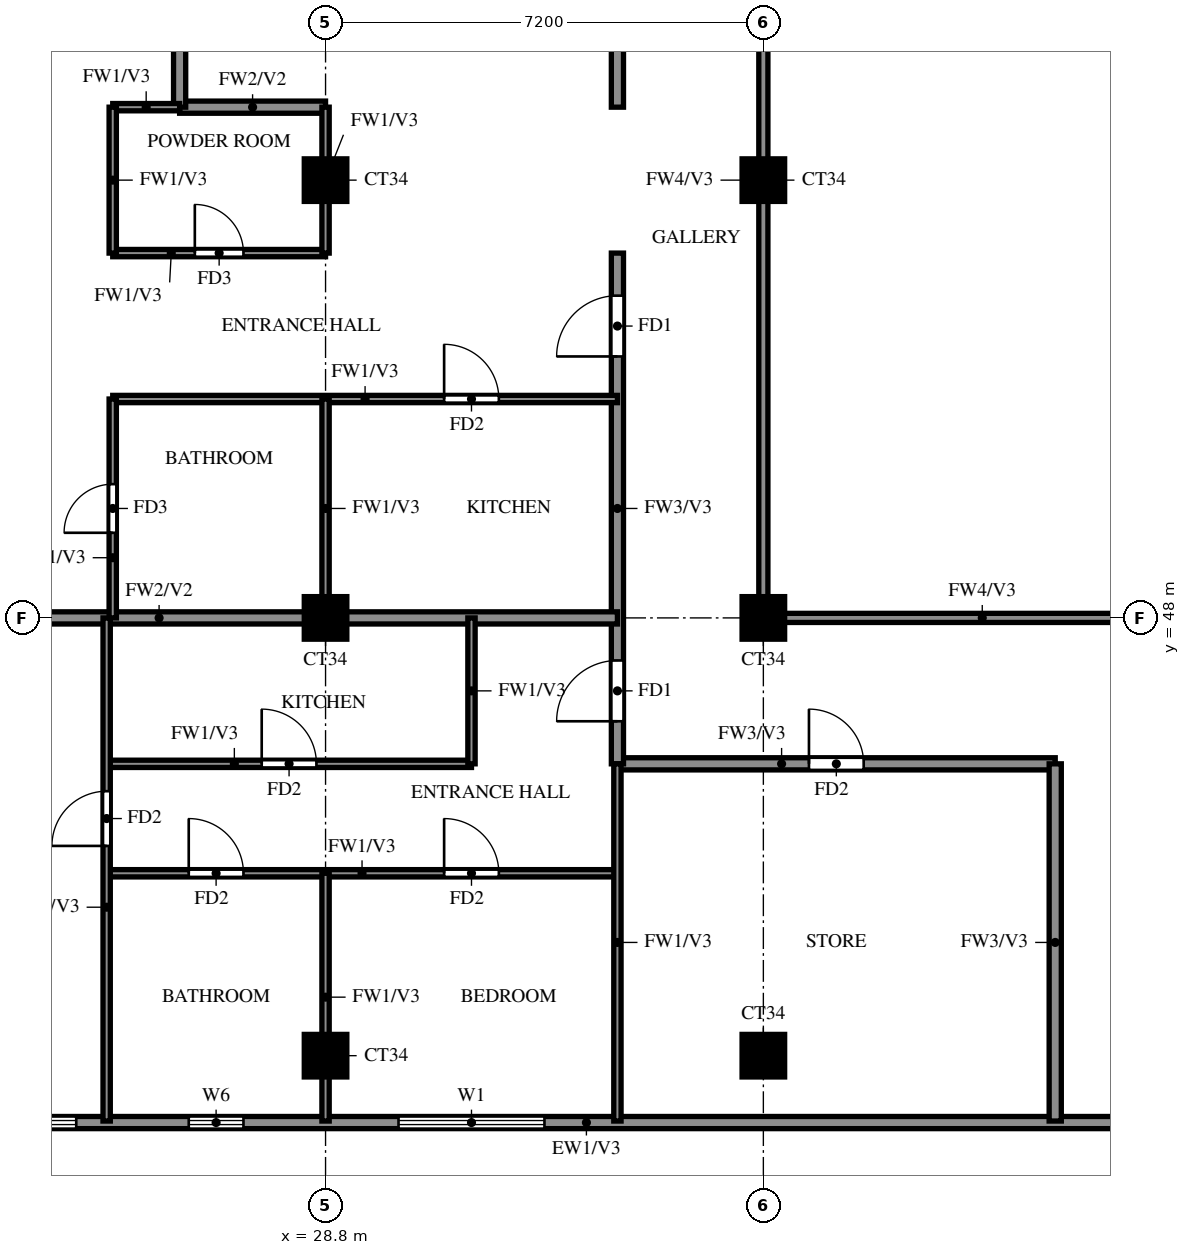
"""IFC4 building model, lengths in metres.
Left out: names, types, materials, properties, quantities, classifications, styles, units other than length and angle.
Written with IfcOpenShell. Run it as: python <this file> out.ifc"""

import sys

from ifc_helpers import new_model, si_unit, direction, frame, frame_2d, origin, origin_2d, place, context, subcontext, project, spatial, rectangle, extrude, source, transform, mapped, element, fill, save


model = new_model("IFC4")
c1 = context("Model", 3, precision=1e-05, world=origin(), true_north=direction((0.0, 1.0)))
c2 = subcontext(c1, "Body", "Model", "MODEL_VIEW")
j1 = project(units=[si_unit("LENGTHUNIT", "METRE"), si_unit("PLANEANGLEUNIT", "RADIAN")], contexts=[c1])
p1 = place(None, origin())
s1 = spatial("IfcSite", under=j1, at=p1, CompositionType="ELEMENT")
p2 = place(p1, origin())
s2 = spatial("IfcBuilding", under=s1, at=p2, CompositionType="ELEMENT")
p3 = place(p2, frame((0.0, 0.0, 257.0)))
s3 = spatial("IfcBuildingStorey", under=s2, at=p3, CompositionType="ELEMENT", Elevation=257.0)
m1 = source(origin(), c2, "Body", "SweptSolid", [
    extrude(rectangle(XDim=0.7, YDim=0.7, at=origin_2d()), origin(), (0.0, 0.0, 1.0), 3.22),
])
for number, where, z_axis, x_axis in (
    (1, (28.8, 40.8, 0.0), (0.0, 0.0, 1.0), (1.0, 0.0, 0.0)),
    (2, (36.0, 40.8, 0.0), (0.0, 0.0, 1.0), (1.0, 0.0, 0.0)),
    (3, (28.8, 48.0, 0.0), (0.0, 0.0, 1.0), (1.0, 0.0, 0.0)),
    (4, (36.0, 48.0, 0.0), (0.0, 0.0, 1.0), (1.0, 0.0, 0.0)),
    (5, (28.8, 55.2, 0.0), (0.0, 0.0, 1.0), (1.0, 0.0, 0.0)),
    (6, (36.0, 55.2, 0.0), (0.0, 0.0, 1.0), (1.0, 0.0, 0.0)),
):
    element("IfcColumn", number, at=place(p3, frame(where, z_axis=z_axis, x_axis=x_axis)), inside=s3, PredefinedType="COLUMN", context=c2, shape_type="MappedRepresentation", body=[
        mapped(m1, transform((0.0, 0.0, 0.0))),
    ])
p4 = place(p3, frame((22.2, 39.7, 0.0), z_axis=(0.0, 0.0, 1.0), x_axis=(1.0, 0.0, 0.0)))
e7 = element("IfcWall", 7, at=p4, inside=s3, PredefinedType="SOLIDWALL", context=c2, shape_type="SweptSolid", body=[
    extrude(rectangle(XDim=19.8, YDim=0.2, at=frame_2d((9.9, 0.0))), origin(), (0.0, 0.0, 1.0), 3.22),
])
p5 = place(p4, frame((0.7, 0.0, 0.6)))
e8 = element("IfcOpeningElement", 8, at=p5, cuts=e7, PredefinedType="OPENING", context=c2, shape_type="SweptSolid", body=[
    extrude(rectangle(XDim=1.8, YDim=2.4, at=frame_2d((0.9, 1.2))), frame((0.0, 0.11, 0.0), z_axis=(0.0, -1.0, 0.0), x_axis=(1.0, 0.0, 0.0)), (0.0, 0.0, 1.0), 0.22),
])
p6 = place(p4, frame((4.35, 0.0, 1.5)))
e9 = element("IfcOpeningElement", 9, at=p6, cuts=e7, PredefinedType="OPENING", context=c2, shape_type="SweptSolid", body=[
    extrude(rectangle(XDim=0.9, YDim=0.9, at=frame_2d((0.45, 0.45))), frame((0.0, 0.11, 0.0), z_axis=(0.0, -1.0, 0.0), x_axis=(1.0, 0.0, 0.0)), (0.0, 0.0, 1.0), 0.22),
])
p7 = place(p4, frame((7.8, 0.0, 0.6)))
e10 = element("IfcOpeningElement", 10, at=p7, cuts=e7, PredefinedType="OPENING", context=c2, shape_type="SweptSolid", body=[
    extrude(rectangle(XDim=2.4, YDim=2.4, at=frame_2d((1.2, 1.2))), frame((0.0, 0.11, 0.0), z_axis=(0.0, -1.0, 0.0), x_axis=(1.0, 0.0, 0.0)), (0.0, 0.0, 1.0), 0.22),
])
p8 = place(p3, frame((33.6, 45.6, 0.0), z_axis=(0.0, 0.0, 1.0), x_axis=(1.0, 0.0, 0.0)))
e11 = element("IfcWall", 11, at=p8, inside=s3, PredefinedType="SOLIDWALL", context=c2, shape_type="SweptSolid", body=[
    extrude(rectangle(XDim=7.2, YDim=0.2, at=frame_2d((3.6, 0.0))), origin(), (0.0, 0.0, 1.0), 3.22),
])
p9 = place(p8, frame((3.15, 0.0, 0.0)))
e12 = element("IfcOpeningElement", 12, at=p9, cuts=e11, PredefinedType="OPENING", context=c2, shape_type="SweptSolid", body=[
    extrude(rectangle(XDim=0.9, YDim=2.1, at=frame_2d((0.45, 1.05))), frame((0.0, 0.11, 0.0), z_axis=(0.0, -1.0, 0.0), x_axis=(1.0, 0.0, 0.0)), (0.0, 0.0, 1.0), 0.22),
])
p10 = place(p3, frame((33.6, 45.6, 0.0), z_axis=(0.0, 0.0, 1.0), x_axis=(0.0, 1.0, 0.0)))
e13 = element("IfcWall", 13, at=p10, inside=s3, PredefinedType="SOLIDWALL", context=c2, shape_type="SweptSolid", body=[
    extrude(rectangle(XDim=8.4, YDim=0.2, at=frame_2d((4.2, 0.0))), origin(), (0.0, 0.0, 1.0), 3.22),
])
p11 = place(p10, frame((0.7, 0.0, 0.0)))
e14 = element("IfcOpeningElement", 14, at=p11, cuts=e13, PredefinedType="OPENING", context=c2, shape_type="SweptSolid", body=[
    extrude(rectangle(XDim=1.0, YDim=2.1, at=frame_2d((0.5, 1.05))), frame((0.0, 0.11, 0.0), z_axis=(0.0, -1.0, 0.0), x_axis=(1.0, 0.0, 0.0)), (0.0, 0.0, 1.0), 0.22),
])
p12 = place(p10, frame((6.7, 0.0, 0.0)))
e15 = element("IfcOpeningElement", 15, at=p12, cuts=e13, PredefinedType="OPENING", context=c2, shape_type="SweptSolid", body=[
    extrude(rectangle(XDim=1.0, YDim=2.1, at=frame_2d((0.5, 1.05))), frame((0.0, 0.11, 0.0), z_axis=(0.0, -1.0, 0.0), x_axis=(1.0, 0.0, 0.0)), (0.0, 0.0, 1.0), 0.22),
])
p13 = place(p3, frame((33.6, 56.4, 0.0), z_axis=(0.0, 0.0, 1.0), x_axis=(0.0, 1.0, 0.0)))
e16 = element("IfcWall", 16, at=p13, inside=s3, PredefinedType="SOLIDWALL", context=c2, shape_type="SweptSolid", body=[
    extrude(rectangle(XDim=6.0, YDim=0.2, at=frame_2d((3.0, 0.0))), origin(), (0.0, 0.0, 1.0), 3.22),
])
p14 = place(p13, frame((3.7, 0.0, 0.0)))
e17 = element("IfcOpeningElement", 17, at=p14, cuts=e16, PredefinedType="OPENING", context=c2, shape_type="SweptSolid", body=[
    extrude(rectangle(XDim=1.0, YDim=2.1, at=frame_2d((0.5, 1.05))), frame((0.0, 0.11, 0.0), z_axis=(0.0, -1.0, 0.0), x_axis=(1.0, 0.0, 0.0)), (0.0, 0.0, 1.0), 0.22),
])
p15 = place(p3, frame((40.8, 39.725, 0.0), z_axis=(0.0, 0.0, 1.0), x_axis=(0.0, 1.0, 0.0)))
e18 = element("IfcWall", 18, at=p15, inside=s3, PredefinedType="SOLIDWALL", context=c2, shape_type="SweptSolid", body=[
    extrude(rectangle(XDim=5.875, YDim=0.2, at=frame_2d((2.938, 0.0))), origin(), (0.0, 0.0, 1.0), 3.22),
])
p16 = place(p3, frame((18.525, 48.0, 0.0), z_axis=(0.0, 0.0, 1.0), x_axis=(1.0, 0.0, 0.0)))
e19 = element("IfcWall", 19, at=p16, inside=s3, PredefinedType="SOLIDWALL", context=c2, shape_type="SweptSolid", body=[
    extrude(rectangle(XDim=15.075, YDim=0.2, at=frame_2d((7.538, 0.0))), origin(), (0.0, 0.0, 1.0), 3.22),
])
for number, where, z_axis, x_axis in (
    (20, (26.4, 56.4, 0.0), (0.0, 0.0, 1.0), (1.0, 0.0, 0.0)),
    (21, (26.4, 56.4, 0.0), (0.0, 0.0, 1.0), (0.0, 1.0, 0.0)),
):
    element("IfcWall", number, at=place(p3, frame(where, z_axis=z_axis, x_axis=x_axis)), inside=s3, PredefinedType="SOLIDWALL", context=c2, shape_type="SweptSolid", body=[
        extrude(rectangle(XDim=2.4, YDim=0.2, at=frame_2d((1.2, 0.0))), origin(), (0.0, 0.0, 1.0), 3.22),
    ])
p17 = place(p3, frame((25.2, 43.8, 0.0), z_axis=(0.0, 0.0, 1.0), x_axis=(1.0, 0.0, 0.0)))
e22 = element("IfcWall", 22, at=p17, inside=s3, PredefinedType="PARTITIONING", context=c2, shape_type="SweptSolid", body=[
    extrude(rectangle(XDim=8.4, YDim=0.12, at=frame_2d((4.2, 0.0))), origin(), (0.0, 0.0, 1.0), 3.22),
])
p18 = place(p17, frame((1.35, 0.0, 0.0)))
e23 = element("IfcOpeningElement", 23, at=p18, cuts=e22, PredefinedType="OPENING", context=c2, shape_type="SweptSolid", body=[
    extrude(rectangle(XDim=0.9, YDim=2.1, at=frame_2d((0.45, 1.05))), frame((0.0, 0.07, 0.0), z_axis=(0.0, -1.0, 0.0), x_axis=(1.0, 0.0, 0.0)), (0.0, 0.0, 1.0), 0.14),
])
p19 = place(p17, frame((5.55, 0.0, 0.0)))
e24 = element("IfcOpeningElement", 24, at=p19, cuts=e22, PredefinedType="OPENING", context=c2, shape_type="SweptSolid", body=[
    extrude(rectangle(XDim=0.9, YDim=2.1, at=frame_2d((0.45, 1.05))), frame((0.0, 0.07, 0.0), z_axis=(0.0, -1.0, 0.0), x_axis=(1.0, 0.0, 0.0)), (0.0, 0.0, 1.0), 0.14),
])
p20 = place(p3, frame((25.2, 45.6, 0.0), z_axis=(0.0, 0.0, 1.0), x_axis=(1.0, 0.0, 0.0)))
e25 = element("IfcWall", 25, at=p20, inside=s3, PredefinedType="PARTITIONING", context=c2, shape_type="SweptSolid", body=[
    extrude(rectangle(XDim=6.0, YDim=0.12, at=frame_2d((3.0, 0.0))), origin(), (0.0, 0.0, 1.0), 3.22),
])
p21 = place(p20, frame((2.55, 0.0, 0.0)))
e26 = element("IfcOpeningElement", 26, at=p21, cuts=e25, PredefinedType="OPENING", context=c2, shape_type="SweptSolid", body=[
    extrude(rectangle(XDim=0.9, YDim=2.1, at=frame_2d((0.45, 1.05))), frame((0.0, 0.07, 0.0), z_axis=(0.0, -1.0, 0.0), x_axis=(1.0, 0.0, 0.0)), (0.0, 0.0, 1.0), 0.14),
])
p22 = place(p3, frame((25.3, 51.6, 0.0), z_axis=(0.0, 0.0, 1.0), x_axis=(1.0, 0.0, 0.0)))
e27 = element("IfcWall", 27, at=p22, inside=s3, PredefinedType="PARTITIONING", context=c2, shape_type="SweptSolid", body=[
    extrude(rectangle(XDim=8.3, YDim=0.12, at=frame_2d((4.15, 0.0))), origin(), (0.0, 0.0, 1.0), 3.22),
])
p23 = place(p22, frame((5.45, 0.0, 0.0)))
e28 = element("IfcOpeningElement", 28, at=p23, cuts=e27, PredefinedType="OPENING", context=c2, shape_type="SweptSolid", body=[
    extrude(rectangle(XDim=0.9, YDim=2.1, at=frame_2d((0.45, 1.05))), frame((0.0, 0.07, 0.0), z_axis=(0.0, -1.0, 0.0), x_axis=(1.0, 0.0, 0.0)), (0.0, 0.0, 1.0), 0.14),
])
p24 = place(p3, frame((25.3, 54.0, 0.0), z_axis=(0.0, 0.0, 1.0), x_axis=(1.0, 0.0, 0.0)))
e29 = element("IfcWall", 29, at=p24, inside=s3, PredefinedType="PARTITIONING", context=c2, shape_type="SweptSolid", body=[
    extrude(rectangle(XDim=3.5, YDim=0.12, at=frame_2d((1.75, 0.0))), origin(), (0.0, 0.0, 1.0), 3.22),
])
p25 = place(p24, frame((1.35, 0.0, 0.0)))
e30 = element("IfcOpeningElement", 30, at=p25, cuts=e29, PredefinedType="OPENING", context=c2, shape_type="SweptSolid", body=[
    extrude(rectangle(XDim=0.8, YDim=2.1, at=frame_2d((0.4, 1.05))), frame((0.0, 0.07, 0.0), z_axis=(0.0, -1.0, 0.0), x_axis=(1.0, 0.0, 0.0)), (0.0, 0.0, 1.0), 0.14),
])
p26 = place(p3, frame((25.3, 56.4, 0.0), z_axis=(0.0, 0.0, 1.0), x_axis=(1.0, 0.0, 0.0)))
e31 = element("IfcWall", 31, at=p26, inside=s3, PredefinedType="PARTITIONING", context=c2, shape_type="SweptSolid", body=[
    extrude(rectangle(XDim=1.1, YDim=0.12, at=frame_2d((0.55, 0.0))), origin(), (0.0, 0.0, 1.0), 3.22),
])
p27 = place(p3, frame((25.2, 39.725, 0.0), z_axis=(0.0, 0.0, 1.0), x_axis=(0.0, 1.0, 0.0)))
e32 = element("IfcWall", 32, at=p27, inside=s3, PredefinedType="PARTITIONING", context=c2, shape_type="SweptSolid", body=[
    extrude(rectangle(XDim=8.275, YDim=0.12, at=frame_2d((4.137, 0.0))), origin(), (0.0, 0.0, 1.0), 3.22),
])
p28 = place(p27, frame((4.525, 0.0, 0.0)))
e33 = element("IfcOpeningElement", 33, at=p28, cuts=e32, PredefinedType="OPENING", context=c2, shape_type="SweptSolid", body=[
    extrude(rectangle(XDim=0.9, YDim=2.1, at=frame_2d((0.45, 1.05))), frame((0.0, 0.07, 0.0), z_axis=(0.0, -1.0, 0.0), x_axis=(1.0, 0.0, 0.0)), (0.0, 0.0, 1.0), 0.14),
])
p29 = place(p3, frame((25.3, 48.0, 0.0), z_axis=(0.0, 0.0, 1.0), x_axis=(0.0, 1.0, 0.0)))
e34 = element("IfcWall", 34, at=p29, inside=s3, PredefinedType="PARTITIONING", context=c2, shape_type="SweptSolid", body=[
    extrude(rectangle(XDim=3.6, YDim=0.12, at=frame_2d((1.8, 0.0))), origin(), (0.0, 0.0, 1.0), 3.22),
])
p30 = place(p29, frame((1.4, 0.0, 0.0)))
e35 = element("IfcOpeningElement", 35, at=p30, cuts=e34, PredefinedType="OPENING", context=c2, shape_type="SweptSolid", body=[
    extrude(rectangle(XDim=0.8, YDim=2.1, at=frame_2d((0.4, 1.05))), frame((0.0, 0.07, 0.0), z_axis=(0.0, -1.0, 0.0), x_axis=(1.0, 0.0, 0.0)), (0.0, 0.0, 1.0), 0.14),
])
p31 = place(p3, frame((25.3, 54.0, 0.0), z_axis=(0.0, 0.0, 1.0), x_axis=(0.0, 1.0, 0.0)))
e36 = element("IfcWall", 36, at=p31, inside=s3, PredefinedType="PARTITIONING", context=c2, shape_type="SweptSolid", body=[
    extrude(rectangle(XDim=2.4, YDim=0.12, at=frame_2d((1.2, 0.0))), origin(), (0.0, 0.0, 1.0), 3.22),
])
p32 = place(p3, frame((28.8, 39.725, 0.0), z_axis=(0.0, 0.0, 1.0), x_axis=(0.0, 1.0, 0.0)))
e37 = element("IfcWall", 37, at=p32, inside=s3, PredefinedType="PARTITIONING", context=c2, shape_type="SweptSolid", body=[
    extrude(rectangle(XDim=4.075, YDim=0.12, at=frame_2d((2.038, 0.0))), origin(), (0.0, 0.0, 1.0), 3.22),
])
p33 = place(p3, frame((28.8, 48.0, 0.0), z_axis=(0.0, 0.0, 1.0), x_axis=(0.0, 1.0, 0.0)))
e38 = element("IfcWall", 38, at=p33, inside=s3, PredefinedType="PARTITIONING", context=c2, shape_type="SweptSolid", body=[
    extrude(rectangle(XDim=3.6, YDim=0.12, at=frame_2d((1.8, 0.0))), origin(), (0.0, 0.0, 1.0), 3.22),
])
for number, where, z_axis, x_axis in (
    (39, (28.8, 54.0, 0.0), (0.0, 0.0, 1.0), (0.0, 1.0, 0.0)),
    (40, (31.2, 45.6, 0.0), (0.0, 0.0, 1.0), (0.0, 1.0, 0.0)),
):
    element("IfcWall", number, at=place(p3, frame(where, z_axis=z_axis, x_axis=x_axis)), inside=s3, PredefinedType="PARTITIONING", context=c2, shape_type="SweptSolid", body=[
        extrude(rectangle(XDim=2.4, YDim=0.12, at=frame_2d((1.2, 0.0))), origin(), (0.0, 0.0, 1.0), 3.22),
    ])
p34 = place(p3, frame((33.6, 39.725, 0.0), z_axis=(0.0, 0.0, 1.0), x_axis=(0.0, 1.0, 0.0)))
e41 = element("IfcWall", 41, at=p34, inside=s3, PredefinedType="PARTITIONING", context=c2, shape_type="SweptSolid", body=[
    extrude(rectangle(XDim=5.875, YDim=0.12, at=frame_2d((2.938, 0.0))), origin(), (0.0, 0.0, 1.0), 3.22),
])
p35 = place(p3, frame((36.0, 48.0, 0.0), z_axis=(0.0, 0.0, 1.0), x_axis=(1.0, 0.0, 0.0)))
e42 = element("IfcWall", 42, at=p35, inside=s3, PredefinedType="SOLIDWALL", context=c2, shape_type="SweptSolid", body=[
    extrude(rectangle(XDim=7.2, YDim=0.15, at=frame_2d((3.6, 0.0))), origin(), (0.0, 0.0, 1.0), 2.32),
])
p36 = place(p3, frame((36.0, 48.0, 0.0), z_axis=(0.0, 0.0, 1.0), x_axis=(0.0, 1.0, 0.0)))
e43 = element("IfcWall", 43, at=p36, inside=s3, PredefinedType="SOLIDWALL", context=c2, shape_type="SweptSolid", body=[
    extrude(rectangle(XDim=14.4, YDim=0.15, at=frame_2d((7.2, 0.0))), origin(), (0.0, 0.0, 1.0), 2.32),
])
p37 = place(p5, origin())
e44 = element("IfcWindow", 44, at=p37, inside=s3, PartitioningType="DOUBLE_PANEL_VERTICAL", PredefinedType="WINDOW", context=c2, shape_type="SweptSolid", body=[
    extrude(rectangle(XDim=1.8, YDim=2.4, at=frame_2d((0.9, 1.2))), frame((0.0, 0.03, 0.0), z_axis=(0.0, -1.0, 0.0), x_axis=(1.0, 0.0, 0.0)), (0.0, 0.0, 1.0), 0.06),
])
fill(e8, e44)
p38 = place(p6, origin())
e45 = element("IfcWindow", 45, at=p38, inside=s3, PartitioningType="SINGLE_PANEL", PredefinedType="WINDOW", context=c2, shape_type="SweptSolid", body=[
    extrude(rectangle(XDim=0.9, YDim=0.9, at=frame_2d((0.45, 0.45))), frame((0.0, 0.03, 0.0), z_axis=(0.0, -1.0, 0.0), x_axis=(1.0, 0.0, 0.0)), (0.0, 0.0, 1.0), 0.06),
])
fill(e9, e45)
p39 = place(p7, origin())
e46 = element("IfcWindow", 46, at=p39, inside=s3, PartitioningType="DOUBLE_PANEL_VERTICAL", PredefinedType="WINDOW", context=c2, shape_type="SweptSolid", body=[
    extrude(rectangle(XDim=2.4, YDim=2.4, at=frame_2d((1.2, 1.2))), frame((0.0, 0.03, 0.0), z_axis=(0.0, -1.0, 0.0), x_axis=(1.0, 0.0, 0.0)), (0.0, 0.0, 1.0), 0.06),
])
fill(e10, e46)
p40 = place(p11, origin())
e47 = element("IfcDoor", 47, at=p40, inside=s3, OperationType="SINGLE_SWING_RIGHT", PredefinedType="DOOR", context=c2, shape_type="SweptSolid", body=[
    extrude(rectangle(XDim=1.0, YDim=2.1, at=frame_2d((0.5, 1.05))), frame((0.0, 0.025, 0.0), z_axis=(0.0, -1.0, 0.0), x_axis=(1.0, 0.0, 0.0)), (0.0, 0.0, 1.0), 0.05),
])
fill(e14, e47)
p41 = place(p28, origin())
e48 = element("IfcDoor", 48, at=p41, inside=s3, OperationType="SINGLE_SWING_LEFT", PredefinedType="DOOR", context=c2, shape_type="SweptSolid", body=[
    extrude(rectangle(XDim=0.9, YDim=2.1, at=frame_2d((0.45, 1.05))), frame((0.0, 0.025, 0.0), z_axis=(0.0, -1.0, 0.0), x_axis=(1.0, 0.0, 0.0)), (0.0, 0.0, 1.0), 0.05),
])
fill(e33, e48)
p42 = place(p18, origin())
e49 = element("IfcDoor", 49, at=p42, inside=s3, OperationType="SINGLE_SWING_LEFT", PredefinedType="DOOR", context=c2, shape_type="SweptSolid", body=[
    extrude(rectangle(XDim=0.9, YDim=2.1, at=frame_2d((0.45, 1.05))), frame((0.0, 0.025, 0.0), z_axis=(0.0, -1.0, 0.0), x_axis=(1.0, 0.0, 0.0)), (0.0, 0.0, 1.0), 0.05),
])
fill(e23, e49)
p43 = place(p19, origin())
e50 = element("IfcDoor", 50, at=p43, inside=s3, OperationType="SINGLE_SWING_RIGHT", PredefinedType="DOOR", context=c2, shape_type="SweptSolid", body=[
    extrude(rectangle(XDim=0.9, YDim=2.1, at=frame_2d((0.45, 1.05))), frame((0.0, 0.025, 0.0), z_axis=(0.0, -1.0, 0.0), x_axis=(1.0, 0.0, 0.0)), (0.0, 0.0, 1.0), 0.05),
])
fill(e24, e50)
p44 = place(p21, origin())
e51 = element("IfcDoor", 51, at=p44, inside=s3, OperationType="SINGLE_SWING_LEFT", PredefinedType="DOOR", context=c2, shape_type="SweptSolid", body=[
    extrude(rectangle(XDim=0.9, YDim=2.1, at=frame_2d((0.45, 1.05))), frame((0.0, 0.025, 0.0), z_axis=(0.0, -1.0, 0.0), x_axis=(1.0, 0.0, 0.0)), (0.0, 0.0, 1.0), 0.05),
])
fill(e26, e51)
p45 = place(p9, origin())
e52 = element("IfcDoor", 52, at=p45, inside=s3, OperationType="SINGLE_SWING_LEFT", PredefinedType="DOOR", context=c2, shape_type="SweptSolid", body=[
    extrude(rectangle(XDim=0.9, YDim=2.1, at=frame_2d((0.45, 1.05))), frame((0.0, 0.025, 0.0), z_axis=(0.0, -1.0, 0.0), x_axis=(1.0, 0.0, 0.0)), (0.0, 0.0, 1.0), 0.05),
])
fill(e12, e52)
p46 = place(p12, origin())
e53 = element("IfcDoor", 53, at=p46, inside=s3, OperationType="SINGLE_SWING_RIGHT", PredefinedType="DOOR", context=c2, shape_type="SweptSolid", body=[
    extrude(rectangle(XDim=1.0, YDim=2.1, at=frame_2d((0.5, 1.05))), frame((0.0, 0.025, 0.0), z_axis=(0.0, -1.0, 0.0), x_axis=(1.0, 0.0, 0.0)), (0.0, 0.0, 1.0), 0.05),
])
fill(e15, e53)
p47 = place(p30, origin())
e54 = element("IfcDoor", 54, at=p47, inside=s3, OperationType="SINGLE_SWING_RIGHT", PredefinedType="DOOR", context=c2, shape_type="SweptSolid", body=[
    extrude(rectangle(XDim=0.8, YDim=2.1, at=frame_2d((0.4, 1.05))), frame((0.0, 0.025, 0.0), z_axis=(0.0, -1.0, 0.0), x_axis=(1.0, 0.0, 0.0)), (0.0, 0.0, 1.0), 0.05),
])
fill(e35, e54)
p48 = place(p25, origin())
e55 = element("IfcDoor", 55, at=p48, inside=s3, OperationType="SINGLE_SWING_LEFT", PredefinedType="DOOR", context=c2, shape_type="SweptSolid", body=[
    extrude(rectangle(XDim=0.8, YDim=2.1, at=frame_2d((0.4, 1.05))), frame((0.0, 0.025, 0.0), z_axis=(0.0, -1.0, 0.0), x_axis=(1.0, 0.0, 0.0)), (0.0, 0.0, 1.0), 0.05),
])
fill(e30, e55)
p49 = place(p23, origin())
e56 = element("IfcDoor", 56, at=p49, inside=s3, OperationType="SINGLE_SWING_LEFT", PredefinedType="DOOR", context=c2, shape_type="SweptSolid", body=[
    extrude(rectangle(XDim=0.9, YDim=2.1, at=frame_2d((0.45, 1.05))), frame((0.0, 0.025, 0.0), z_axis=(0.0, -1.0, 0.0), x_axis=(1.0, 0.0, 0.0)), (0.0, 0.0, 1.0), 0.05),
])
fill(e28, e56)
save(model, sys.argv[1])
